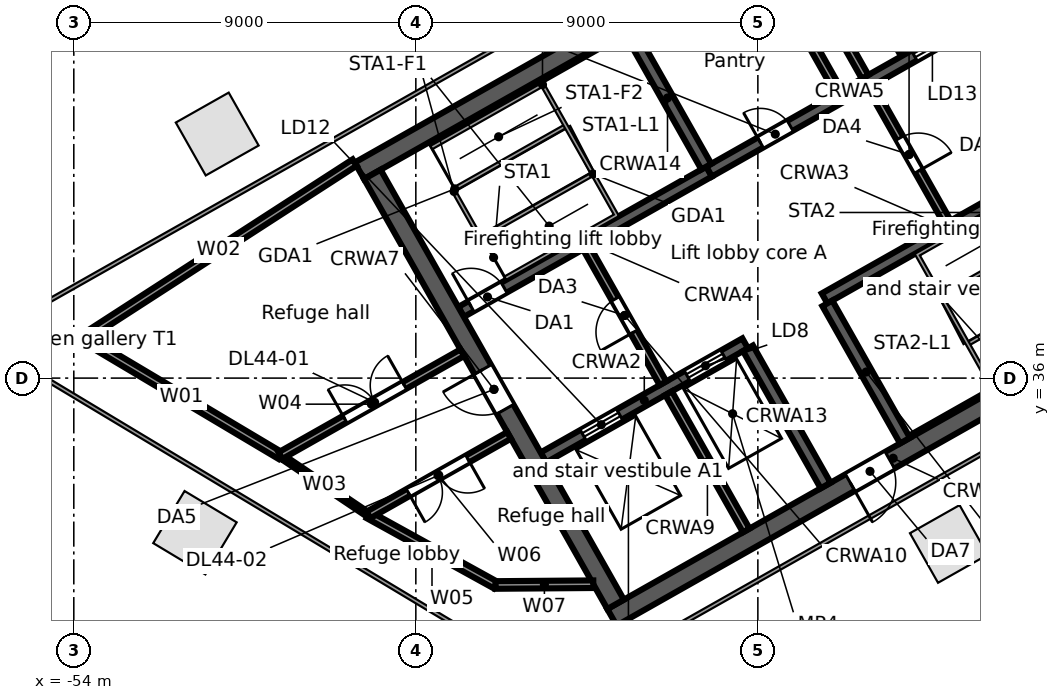
"""IFC4 building model, lengths in metres.
Left out: names, types, materials, properties, quantities, classifications, styles, units other than length and angle.
Written with IfcOpenShell. Run it as: python <this file> out.ifc"""

import sys

from ifc_helpers import new_model, si_unit, direction, frame, frame_2d, origin, origin_2d, place, context, subcontext, project, spatial, rectangle, extrude, element, fill, save


model = new_model("IFC4")
c1 = context("Model", 3, precision=1e-05, world=origin(), true_north=direction((0.0, 1.0)))
c2 = subcontext(c1, "Body", "Model", "MODEL_VIEW")
j1 = project(units=[si_unit("LENGTHUNIT", "METRE"), si_unit("PLANEANGLEUNIT", "RADIAN")], contexts=[c1])
p1 = place(None, origin())
s1 = spatial("IfcSite", under=j1, at=p1, CompositionType="ELEMENT")
p2 = place(p1, origin())
s2 = spatial("IfcBuilding", under=s1, at=p2, CompositionType="ELEMENT")
p3 = place(p2, frame((0.0, 0.0, 202.9)))
s3 = spatial("IfcBuildingStorey", under=s2, at=p3, CompositionType="ELEMENT", Elevation=202.9)
for number, where, z_axis, x_axis in (
    (1, (-50.226, 42.423, 0.0), (0.0, 0.0, 1.0), (-0.87, -0.492, 0.0)),
    (2, (-50.812, 31.931, 0.0), (0.0, 0.0, 1.0), (0.857, -0.515, 0.0)),
):
    element("IfcColumn", number, at=place(p3, frame(where, z_axis=z_axis, x_axis=x_axis)), inside=s3, PredefinedType="COLUMN", context=c2, shape_type="SweptSolid", body=[
        extrude(rectangle(XDim=1.6, YDim=1.6, at=origin_2d()), origin(), (0.0, 0.0, 1.0), 4.6),
    ])
p4 = place(p3, frame((-30.976, 31.635, 0.0), z_axis=(0.0, 0.0, 1.0), x_axis=(0.87035569594, 0.492423560103, 0.0)))
e3 = element("IfcColumn", 3, at=p4, inside=s3, PredefinedType="COLUMN", context=c2, shape_type="SweptSolid", body=[
    extrude(rectangle(XDim=1.5, YDim=1.5, at=origin_2d()), origin(), (0.0, 0.0, 1.0), 4.6),
])
p5 = place(p3, frame((-39.838, 29.705, 0.0), z_axis=(0.0, 0.0, 1.0), x_axis=(0.870350116061, 0.492433422375, 0.0)))
e4 = element("IfcWall", 4, at=p5, inside=s3, PredefinedType="SOLIDWALL", context=c2, shape_type="SweptSolid", body=[
    extrude(rectangle(XDim=17.0, YDim=0.5, at=frame_2d((8.5, 0.0))), origin(), (0.0, 0.0, 1.0), 4.32),
])
p6 = place(p5, frame((7.2, 0.0, 0.0)))
e5 = element("IfcOpeningElement", 5, at=p6, cuts=e4, PredefinedType="OPENING", context=c2, shape_type="SweptSolid", body=[
    extrude(rectangle(XDim=1.2, YDim=2.1, at=frame_2d((0.6, 1.05))), frame((0.0, 0.26, 0.0), z_axis=(0.0, -1.0, 0.0), x_axis=(1.0, 0.0, 0.0)), (0.0, 0.0, 1.0), 0.52),
])
p7 = place(p3, frame((-41.643, 33.912, 0.0), z_axis=(0.0, 0.0, 1.0), x_axis=(0.870343599782, 0.492444939378, 0.0)))
e6 = element("IfcWall", 6, at=p7, inside=s3, PredefinedType="SOLIDWALL", context=c2, shape_type="SweptSolid", body=[
    extrude(rectangle(XDim=6.1, YDim=0.3, at=frame_2d((3.05, 0.0))), origin(), (0.0, 0.0, 1.0), 4.32),
])
p8 = place(p7, frame((1.2, 0.0, 0.0)))
e7 = element("IfcOpeningElement", 7, at=p8, cuts=e6, PredefinedType="OPENING", context=c2, shape_type="SweptSolid", body=[
    extrude(rectangle(XDim=1.1, YDim=2.1, at=frame_2d((0.55, 1.05))), frame((0.0, 0.16, 0.0), z_axis=(0.0, -1.0, 0.0), x_axis=(1.0, 0.0, 0.0)), (0.0, 0.0, 1.0), 0.32),
])
p9 = place(p7, frame((4.35, 0.0, 0.0)))
e8 = element("IfcOpeningElement", 8, at=p9, cuts=e6, PredefinedType="OPENING", context=c2, shape_type="SweptSolid", body=[
    extrude(rectangle(XDim=1.1, YDim=2.1, at=frame_2d((0.55, 1.05))), frame((0.0, 0.16, 0.0), z_axis=(0.0, -1.0, 0.0), x_axis=(1.0, 0.0, 0.0)), (0.0, 0.0, 1.0), 0.32),
])
p10 = place(p3, frame((-34.245, 38.097, 0.0), z_axis=(0.0, 0.0, 1.0), x_axis=(0.870364520461, 0.492407962489, 0.0)))
e9 = element("IfcWall", 9, at=p10, inside=s3, PredefinedType="SOLIDWALL", context=c2, shape_type="SweptSolid", body=[
    extrude(rectangle(XDim=7.5, YDim=0.3, at=frame_2d((3.75, 0.0))), origin(), (0.0, 0.0, 1.0), 4.32),
])
p11 = place(p10, frame((6.2, 0.0, 0.0)))
e10 = element("IfcOpeningElement", 10, at=p11, cuts=e9, PredefinedType="OPENING", context=c2, shape_type="SweptSolid", body=[
    extrude(rectangle(XDim=1.0, YDim=2.1, at=frame_2d((0.5, 1.05))), frame((0.0, 0.16, 0.0), z_axis=(0.0, -1.0, 0.0), x_axis=(1.0, 0.0, 0.0)), (0.0, 0.0, 1.0), 0.32),
])
p12 = place(p3, frame((-43.81, 37.741, 0.0), z_axis=(0.0, 0.0, 1.0), x_axis=(0.870350569555, 0.492432620848, 0.0)))
e11 = element("IfcWall", 11, at=p12, inside=s3, PredefinedType="SOLIDWALL", context=c2, shape_type="SweptSolid", body=[
    extrude(rectangle(XDim=7.5, YDim=0.3, at=frame_2d((3.75, 0.0))), origin(), (0.0, 0.0, 1.0), 4.32),
])
p13 = place(p12, frame((0.3, 0.0, 0.0)))
e12 = element("IfcOpeningElement", 12, at=p13, cuts=e11, PredefinedType="OPENING", context=c2, shape_type="SweptSolid", body=[
    extrude(rectangle(XDim=1.0, YDim=2.1, at=frame_2d((0.5, 1.05))), frame((0.0, 0.16, 0.0), z_axis=(0.0, -1.0, 0.0), x_axis=(1.0, 0.0, 0.0)), (0.0, 0.0, 1.0), 0.32),
])
p14 = place(p3, frame((-37.282, 41.435, 0.0), z_axis=(0.0, 0.0, 1.0), x_axis=(0.870356271124, 0.492422543467, 0.0)))
e13 = element("IfcWall", 13, at=p14, inside=s3, PredefinedType="SOLIDWALL", context=c2, shape_type="SweptSolid", body=[
    extrude(rectangle(XDim=8.5, YDim=0.3, at=frame_2d((4.25, 0.0))), origin(), (0.0, 0.0, 1.0), 4.32),
])
p15 = place(p14, frame((6.2, 0.0, 0.0)))
e14 = element("IfcOpeningElement", 14, at=p15, cuts=e13, PredefinedType="OPENING", context=c2, shape_type="SweptSolid", body=[
    extrude(rectangle(XDim=1.1, YDim=2.1, at=frame_2d((0.55, 1.05))), frame((0.0, 0.16, 0.0), z_axis=(0.0, -1.0, 0.0), x_axis=(1.0, 0.0, 0.0)), (0.0, 0.0, 1.0), 0.32),
])
p16 = place(p14, frame((1.55, 0.0, 0.0)))
e15 = element("IfcOpeningElement", 15, at=p16, cuts=e13, PredefinedType="OPENING", context=c2, shape_type="SweptSolid", body=[
    extrude(rectangle(XDim=0.9, YDim=2.1, at=frame_2d((0.45, 1.05))), frame((0.0, 0.16, 0.0), z_axis=(0.0, -1.0, 0.0), x_axis=(1.0, 0.0, 0.0)), (0.0, 0.0, 1.0), 0.32),
])
p17 = place(p3, frame((-46.486, 41.455, 0.0), z_axis=(0.0, 0.0, 1.0), x_axis=(0.870353598469, 0.492427267353, 0.0)))
e16 = element("IfcWall", 16, at=p17, inside=s3, PredefinedType="SOLIDWALL", context=c2, shape_type="SweptSolid", body=[
    extrude(rectangle(XDim=17.0, YDim=0.5, at=frame_2d((8.5, 0.0))), origin(), (0.0, 0.0, 1.0), 4.32),
])
p18 = place(p3, frame((-46.145, 41.361, 0.0), z_axis=(0.0, 0.0, 1.0), x_axis=(0.492435316254, -0.870349044525, 0.0)))
e17 = element("IfcWall", 17, at=p18, inside=s3, PredefinedType="SOLIDWALL", context=c2, shape_type="SweptSolid", body=[
    extrude(rectangle(XDim=13.0, YDim=0.5, at=frame_2d((6.5, 0.0))), origin(), (0.0, 0.0, 1.0), 4.32),
])
p19 = place(p18, frame((5.9, 0.0, 0.0)))
e18 = element("IfcOpeningElement", 18, at=p19, cuts=e17, PredefinedType="OPENING", context=c2, shape_type="SweptSolid", body=[
    extrude(rectangle(XDim=1.2, YDim=2.1, at=frame_2d((0.6, 1.05))), frame((0.0, 0.26, 0.0), z_axis=(0.0, -1.0, 0.0), x_axis=(1.0, 0.0, 0.0)), (0.0, 0.0, 1.0), 0.52),
])
p20 = place(p3, frame((-38.349, 35.603, 0.0), z_axis=(0.0, 0.0, 1.0), x_axis=(0.492396453737, -0.870371031427, 0.0)))
e19 = element("IfcWall", 19, at=p20, inside=s3, PredefinedType="SOLIDWALL", context=c2, shape_type="SweptSolid", body=[
    extrude(rectangle(XDim=4.15, YDim=0.2, at=frame_2d((2.075, 0.0))), origin(), (0.0, 0.0, 1.0), 4.32),
])
p21 = place(p3, frame((-40.516, 39.433, 0.0), z_axis=(0.0, 0.0, 1.0), x_axis=(0.492453559952, -0.87033872216, 0.0)))
e20 = element("IfcWall", 20, at=p21, inside=s3, PredefinedType="PARTITIONING", context=c2, shape_type="SweptSolid", body=[
    extrude(rectangle(XDim=4.1, YDim=0.2, at=frame_2d((2.05, 0.0))), origin(), (0.0, 0.0, 1.0), 4.32),
])
p22 = place(p21, frame((1.55, 0.0, 0.0)))
e21 = element("IfcOpeningElement", 21, at=p22, cuts=e20, PredefinedType="OPENING", context=c2, shape_type="SweptSolid", body=[
    extrude(rectangle(XDim=1.0, YDim=2.1, at=frame_2d((0.5, 1.05))), frame((0.0, 0.11, 0.0), z_axis=(0.0, -1.0, 0.0), x_axis=(1.0, 0.0, 0.0)), (0.0, 0.0, 1.0), 0.22),
])
for number, where, z_axis, x_axis in (
    (22, (-36.26, 36.785, 0.0), (0.0, 0.0, 1.0), (0.492, -0.87, 0.0)),
    (23, (-39.399, 45.177, 0.0), (0.0, 0.0, 1.0), (0.492, -0.87, 0.0)),
    (24, (-34.171, 37.967, 0.0), (0.0, 0.0, 1.0), (0.492, -0.87, 0.0)),
):
    element("IfcWall", number, at=place(p3, frame(where, z_axis=z_axis, x_axis=x_axis)), inside=s3, PredefinedType="SOLIDWALL", context=c2, shape_type="SweptSolid", body=[
        extrude(rectangle(XDim=4.15, YDim=0.3, at=frame_2d((2.075, 0.0))), origin(), (0.0, 0.0, 1.0), 4.32),
    ])
p23 = place(p3, frame((-35.918, 47.147, 0.0), z_axis=(0.0, 0.0, 1.0), x_axis=(0.492441017253, -0.870345818929, 0.0)))
e25 = element("IfcWall", 25, at=p23, inside=s3, PredefinedType="SOLIDWALL", context=c2, shape_type="SweptSolid", body=[
    extrude(rectangle(XDim=4.15, YDim=0.2, at=frame_2d((2.075, 0.0))), origin(), (0.0, 0.0, 1.0), 4.32),
])
p24 = place(p3, frame((-33.031, 43.667, 0.0), z_axis=(0.0, 0.0, 1.0), x_axis=(0.492408451753, -0.87036424366, 0.0)))
e26 = element("IfcWall", 26, at=p24, inside=s3, PredefinedType="PARTITIONING", context=c2, shape_type="SweptSolid", body=[
    extrude(rectangle(XDim=4.1, YDim=0.2, at=frame_2d((2.05, 0.0))), origin(), (0.0, 0.0, 1.0), 4.32),
])
p25 = place(p24, frame((1.55, 0.0, 0.0)))
e27 = element("IfcOpeningElement", 27, at=p25, cuts=e26, PredefinedType="OPENING", context=c2, shape_type="SweptSolid", body=[
    extrude(rectangle(XDim=1.0, YDim=2.1, at=frame_2d((0.5, 1.05))), frame((0.0, 0.11, 0.0), z_axis=(0.0, -1.0, 0.0), x_axis=(1.0, 0.0, 0.0)), (0.0, 0.0, 1.0), 0.22),
])
p26 = place(p3, frame((-35.222, 47.541, 0.0), z_axis=(0.0, 0.0, 1.0), x_axis=(0.492421666909, -0.870356767055, 0.0)))
e28 = element("IfcWall", 28, at=p26, inside=s3, PredefinedType="SOLIDWALL", context=c2, shape_type="SweptSolid", body=[
    extrude(rectangle(XDim=4.15, YDim=0.2, at=frame_2d((2.075, 0.0))), origin(), (0.0, 0.0, 1.0), 4.32),
])
p27 = place(p3, frame((-31.784, 49.486, 0.0), z_axis=(0.0, 0.0, 1.0), x_axis=(0.492435316254, -0.870349044525, 0.0)))
e29 = element("IfcWall", 29, at=p27, inside=s3, PredefinedType="SOLIDWALL", context=c2, shape_type="SweptSolid", body=[
    extrude(rectangle(XDim=13.0, YDim=0.5, at=frame_2d((6.5, 0.0))), origin(), (0.0, 0.0, 1.0), 4.32),
])
p28 = place(p27, frame((5.9, 0.0, 0.0)))
e30 = element("IfcOpeningElement", 30, at=p28, cuts=e29, PredefinedType="OPENING", context=c2, shape_type="SweptSolid", body=[
    extrude(rectangle(XDim=1.2, YDim=2.1, at=frame_2d((0.6, 1.05))), frame((0.0, 0.26, 0.0), z_axis=(0.0, -1.0, 0.0), x_axis=(1.0, 0.0, 0.0)), (0.0, 0.0, 1.0), 0.52),
])
p29 = place(p3, frame((-53.76, 37.052, 0.0), z_axis=(0.0, 0.0, 1.0), x_axis=(0.859354145891, -0.511380926453, 0.0)))
e31 = element("IfcWall", 31, at=p29, inside=s3, PredefinedType="PARTITIONING", context=c2, shape_type="SweptSolid", body=[
    extrude(rectangle(XDim=6.046, YDim=0.2, at=frame_2d((3.023, 0.0))), origin(), (0.0, 0.0, 1.0), 4.32),
])
p30 = place(p3, frame((-53.76, 37.052, 0.0), z_axis=(0.0, 0.0, 1.0), x_axis=(0.83989696129, 0.542745883831, 0.0)))
e32 = element("IfcWall", 32, at=p30, inside=s3, PredefinedType="PARTITIONING", context=c2, shape_type="SweptSolid", body=[
    extrude(rectangle(XDim=8.514, YDim=0.2, at=frame_2d((4.257, 0.0))), origin(), (0.0, 0.0, 1.0), 3.6),
])
p31 = place(p3, frame((-48.564, 33.96, 0.0), z_axis=(0.0, 0.0, 1.0), x_axis=(0.829704455742, -0.558202934533, 0.0)))
e33 = element("IfcWall", 33, at=p31, inside=s3, PredefinedType="PARTITIONING", context=c2, shape_type="SweptSolid", body=[
    extrude(rectangle(XDim=2.795, YDim=0.125, at=frame_2d((1.397, 0.0))), origin(), (0.0, 0.0, 1.0), 3.6),
])
p32 = place(p3, frame((-48.564, 33.96, 0.0), z_axis=(0.0, 0.0, 1.0), x_axis=(0.870376753535, 0.492386339073, 0.0)))
e34 = element("IfcWall", 34, at=p32, inside=s3, PredefinedType="PARTITIONING", context=c2, shape_type="SweptSolid", body=[
    extrude(rectangle(XDim=5.5, YDim=0.2, at=frame_2d((2.75, 0.0))), origin(), (0.0, 0.0, 1.0), 3.6),
])
p33 = place(p32, frame((1.95, 0.0, 0.0)))
e35 = element("IfcOpeningElement", 35, at=p33, cuts=e34, PredefinedType="OPENING", context=c2, shape_type="SweptSolid", body=[
    extrude(rectangle(XDim=1.8, YDim=2.1, at=frame_2d((0.9, 1.05))), frame((0.0, 0.11, 0.0), z_axis=(0.0, -1.0, 0.0), x_axis=(1.0, 0.0, 0.0)), (0.0, 0.0, 1.0), 0.22),
])
p34 = place(p3, frame((-46.245, 32.4, 0.0), z_axis=(0.0, 0.0, 1.0), x_axis=(0.875505825741, -0.483207563158, 0.0)))
e36 = element("IfcWall", 36, at=p34, inside=s3, PredefinedType="PARTITIONING", context=c2, shape_type="SweptSolid", body=[
    extrude(rectangle(XDim=3.816, YDim=0.2, at=frame_2d((1.908, 0.0))), origin(), (0.0, 0.0, 1.0), 4.32),
])
p35 = place(p3, frame((-46.245, 32.4, 0.0), z_axis=(0.0, 0.0, 1.0), x_axis=(0.870444050186, 0.492267361803, 0.0)))
e37 = element("IfcWall", 37, at=p35, inside=s3, PredefinedType="PARTITIONING", context=c2, shape_type="SweptSolid", body=[
    extrude(rectangle(XDim=4.25, YDim=0.2, at=frame_2d((2.125, 0.0))), origin(), (0.0, 0.0, 1.0), 4.32),
])
p36 = place(p35, frame((1.2, 0.0, 0.0)))
e38 = element("IfcOpeningElement", 38, at=p36, cuts=e37, PredefinedType="OPENING", context=c2, shape_type="SweptSolid", body=[
    extrude(rectangle(XDim=1.8, YDim=2.1, at=frame_2d((0.9, 1.05))), frame((0.0, 0.11, 0.0), z_axis=(0.0, -1.0, 0.0), x_axis=(1.0, 0.0, 0.0)), (0.0, 0.0, 1.0), 0.22),
])
p37 = place(p3, frame((-42.904, 30.556, 0.0), z_axis=(0.0, 0.0, 1.0), x_axis=(0.999969755278, 0.007777437156, 0.0)))
e39 = element("IfcWall", 39, at=p37, inside=s3, PredefinedType="PARTITIONING", context=c2, shape_type="SweptSolid", body=[
    extrude(rectangle(XDim=2.574, YDim=0.2, at=frame_2d((1.287, 0.0))), origin(), (0.0, 0.0, 1.0), 3.794),
])
p38 = place(p15, origin())
e40 = element("IfcDoor", 40, at=p38, inside=s3, OperationType="DOUBLE_DOOR_SLIDING", PredefinedType="DOOR", context=c2, shape_type="SweptSolid", body=[
    extrude(rectangle(XDim=1.1, YDim=2.1, at=frame_2d((0.55, 1.05))), frame((0.0, 0.025, 0.0), z_axis=(0.0, -1.0, 0.0), x_axis=(1.0, 0.0, 0.0)), (0.0, 0.0, 1.0), 0.05),
])
fill(e14, e40)
p39 = place(p8, origin())
e41 = element("IfcDoor", 41, at=p39, inside=s3, OperationType="DOUBLE_DOOR_SLIDING", PredefinedType="DOOR", context=c2, shape_type="SweptSolid", body=[
    extrude(rectangle(XDim=1.1, YDim=2.1, at=frame_2d((0.55, 1.05))), frame((0.0, 0.025, 0.0), z_axis=(0.0, -1.0, 0.0), x_axis=(1.0, 0.0, 0.0)), (0.0, 0.0, 1.0), 0.05),
])
fill(e7, e41)
p40 = place(p9, origin())
e42 = element("IfcDoor", 42, at=p40, inside=s3, OperationType="DOUBLE_DOOR_SLIDING", PredefinedType="DOOR", context=c2, shape_type="SweptSolid", body=[
    extrude(rectangle(XDim=1.1, YDim=2.1, at=frame_2d((0.55, 1.05))), frame((0.0, 0.025, 0.0), z_axis=(0.0, -1.0, 0.0), x_axis=(1.0, 0.0, 0.0)), (0.0, 0.0, 1.0), 0.05),
])
fill(e8, e42)
p41 = place(p13, origin())
e43 = element("IfcDoor", 43, at=p41, inside=s3, OperationType="SINGLE_SWING_LEFT", PredefinedType="DOOR", context=c2, shape_type="SweptSolid", body=[
    extrude(rectangle(XDim=1.0, YDim=2.1, at=frame_2d((0.5, 1.05))), frame((0.0, 0.025, 0.0), z_axis=(0.0, -1.0, 0.0), x_axis=(1.0, 0.0, 0.0)), (0.0, 0.0, 1.0), 0.05),
])
fill(e12, e43)
p42 = place(p22, frame((1.0, 0.0, 0.0), z_axis=(0.0, 0.0, 1.0), x_axis=(-1.0, 0.0, 0.0)))
e44 = element("IfcDoor", 44, at=p42, inside=s3, OperationType="SINGLE_SWING_LEFT", PredefinedType="DOOR", context=c2, shape_type="SweptSolid", body=[
    extrude(rectangle(XDim=1.0, YDim=2.1, at=frame_2d((0.5, 1.05))), frame((0.0, 0.025, 0.0), z_axis=(0.0, -1.0, 0.0), x_axis=(1.0, 0.0, 0.0)), (0.0, 0.0, 1.0), 0.05),
])
fill(e21, e44)
p43 = place(p19, frame((1.2, 0.0, 0.0), z_axis=(0.0, 0.0, 1.0), x_axis=(-1.0, 0.0, 0.0)))
e45 = element("IfcDoor", 45, at=p43, inside=s3, OperationType="SINGLE_SWING_RIGHT", PredefinedType="DOOR", context=c2, shape_type="SweptSolid", body=[
    extrude(rectangle(XDim=1.2, YDim=2.1, at=frame_2d((0.6, 1.05))), frame((0.0, 0.025, 0.0), z_axis=(0.0, -1.0, 0.0), x_axis=(1.0, 0.0, 0.0)), (0.0, 0.0, 1.0), 0.05),
])
fill(e18, e45)
p44 = place(p25, origin())
e46 = element("IfcDoor", 46, at=p44, inside=s3, OperationType="SINGLE_SWING_RIGHT", PredefinedType="DOOR", context=c2, shape_type="SweptSolid", body=[
    extrude(rectangle(XDim=1.0, YDim=2.1, at=frame_2d((0.5, 1.05))), frame((0.0, 0.025, 0.0), z_axis=(0.0, -1.0, 0.0), x_axis=(1.0, 0.0, 0.0)), (0.0, 0.0, 1.0), 0.05),
])
fill(e27, e46)
p45 = place(p6, frame((1.2, 0.0, 0.0), z_axis=(0.0, 0.0, 1.0), x_axis=(-1.0, 0.0, 0.0)))
e47 = element("IfcDoor", 47, at=p45, inside=s3, OperationType="SINGLE_SWING_RIGHT", PredefinedType="DOOR", context=c2, shape_type="SweptSolid", body=[
    extrude(rectangle(XDim=1.2, YDim=2.1, at=frame_2d((0.6, 1.05))), frame((0.0, 0.025, 0.0), z_axis=(0.0, -1.0, 0.0), x_axis=(1.0, 0.0, 0.0)), (0.0, 0.0, 1.0), 0.05),
])
fill(e5, e47)
p46 = place(p16, origin())
e48 = element("IfcDoor", 48, at=p46, inside=s3, OperationType="SINGLE_SWING_LEFT", PredefinedType="DOOR", context=c2, shape_type="SweptSolid", body=[
    extrude(rectangle(XDim=0.9, YDim=2.1, at=frame_2d((0.45, 1.05))), frame((0.0, 0.025, 0.0), z_axis=(0.0, -1.0, 0.0), x_axis=(1.0, 0.0, 0.0)), (0.0, 0.0, 1.0), 0.05),
])
fill(e15, e48)
p47 = place(p33, origin())
e49 = element("IfcDoor", 49, at=p47, inside=s3, OperationType="DOUBLE_DOOR_SINGLE_SWING", PredefinedType="DOOR", context=c2, shape_type="SweptSolid", body=[
    extrude(rectangle(XDim=1.8, YDim=2.1, at=frame_2d((0.9, 1.05))), frame((0.0, 0.025, 0.0), z_axis=(0.0, -1.0, 0.0), x_axis=(1.0, 0.0, 0.0)), (0.0, 0.0, 1.0), 0.05),
])
fill(e35, e49)
p48 = place(p36, frame((1.8, 0.0, 0.0), z_axis=(0.0, 0.0, 1.0), x_axis=(-1.0, 0.0, 0.0)))
e50 = element("IfcDoor", 50, at=p48, inside=s3, OperationType="DOUBLE_DOOR_SINGLE_SWING", PredefinedType="DOOR", context=c2, shape_type="SweptSolid", body=[
    extrude(rectangle(XDim=1.8, YDim=2.1, at=frame_2d((0.9, 1.05))), frame((0.0, 0.025, 0.0), z_axis=(0.0, -1.0, 0.0), x_axis=(1.0, 0.0, 0.0)), (0.0, 0.0, 1.0), 0.05),
])
fill(e38, e50)
save(model, sys.argv[1])
